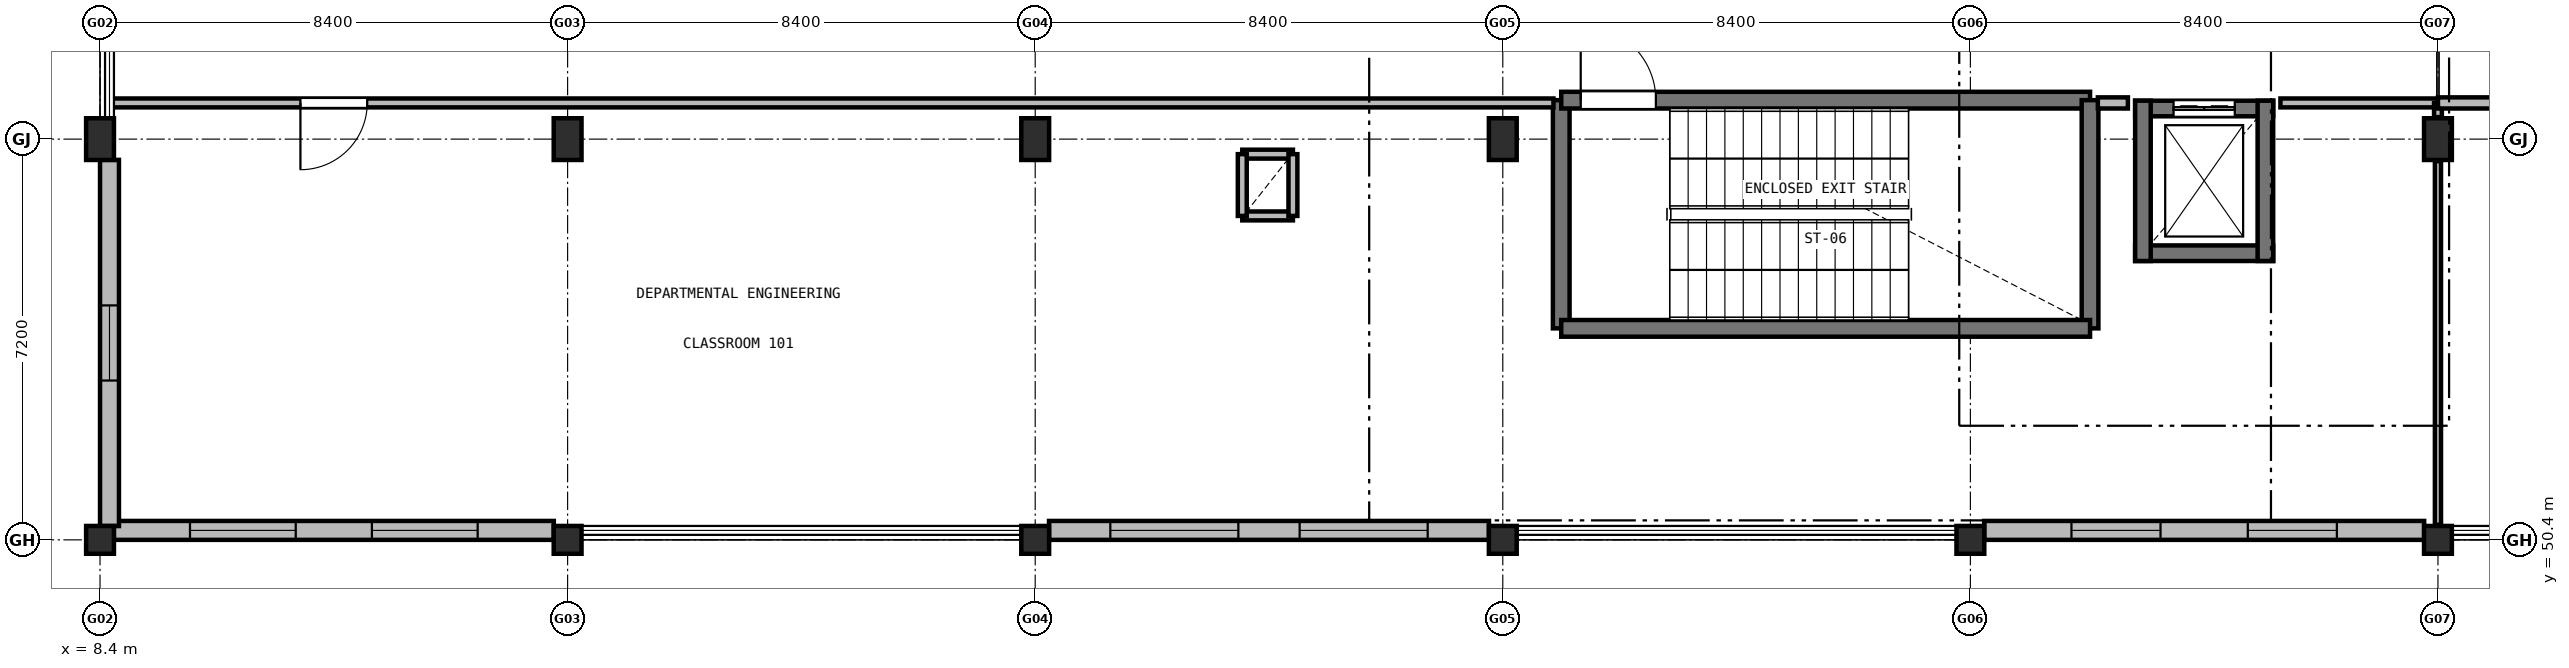
"""IFC4 building model, lengths in metres.
Left out: names, types, materials, properties, quantities, classifications, styles, units other than length and angle.
Written with IfcOpenShell. Run it as: python <this file> out.ifc"""

import sys

from ifc_helpers import new_model, si_unit, direction, frame, frame_2d, origin, origin_2d, place, context, subcontext, project, spatial, rectangle, extrude, element, fill, save


model = new_model("IFC4")
c1 = context("Model", 3, precision=1e-05, world=origin(), true_north=direction((0.0, 1.0)))
c2 = subcontext(c1, "Body", "Model", "MODEL_VIEW")
j1 = project(units=[si_unit("LENGTHUNIT", "METRE"), si_unit("PLANEANGLEUNIT", "RADIAN")], contexts=[c1])
p1 = place(None, origin())
s1 = spatial("IfcSite", under=j1, at=p1, CompositionType="ELEMENT")
p2 = place(p1, origin())
s2 = spatial("IfcBuilding", under=s1, at=p2, CompositionType="ELEMENT")
p3 = place(p2, frame((0.0, 0.0, 5.1)))
s3 = spatial("IfcBuildingStorey", under=s2, at=p3, CompositionType="ELEMENT", Elevation=5.1)
p4 = place(p3, frame((8.4, 50.4, 0.0), z_axis=(0.0, 0.0, 1.0), x_axis=(1.0, 0.0, 0.0)))
e1 = element("IfcColumn", 1, at=p4, inside=s3, PredefinedType="COLUMN", context=c2, shape_type="SweptSolid", body=[
    extrude(rectangle(XDim=0.5, YDim=0.5, at=origin_2d()), origin(), (0.0, 0.0, 1.0), 4.2),
])
p5 = place(p3, frame((8.4, 57.6, 0.0), z_axis=(0.0, 0.0, 1.0), x_axis=(1.0, 0.0, 0.0)))
e2 = element("IfcColumn", 2, at=p5, inside=s3, PredefinedType="COLUMN", context=c2, shape_type="SweptSolid", body=[
    extrude(rectangle(XDim=0.5, YDim=0.75, at=origin_2d()), origin(), (0.0, 0.0, 1.0), 4.2),
])
p6 = place(p3, frame((16.8, 50.4, 0.0), z_axis=(0.0, 0.0, 1.0), x_axis=(1.0, 0.0, 0.0)))
e3 = element("IfcColumn", 3, at=p6, inside=s3, PredefinedType="COLUMN", context=c2, shape_type="SweptSolid", body=[
    extrude(rectangle(XDim=0.5, YDim=0.5, at=origin_2d()), origin(), (0.0, 0.0, 1.0), 4.2),
])
p7 = place(p3, frame((16.8, 57.6, 0.0), z_axis=(0.0, 0.0, 1.0), x_axis=(1.0, 0.0, 0.0)))
e4 = element("IfcColumn", 4, at=p7, inside=s3, PredefinedType="COLUMN", context=c2, shape_type="SweptSolid", body=[
    extrude(rectangle(XDim=0.5, YDim=0.75, at=origin_2d()), origin(), (0.0, 0.0, 1.0), 4.2),
])
p8 = place(p3, frame((25.2, 50.4, 0.0), z_axis=(0.0, 0.0, 1.0), x_axis=(1.0, 0.0, 0.0)))
e5 = element("IfcColumn", 5, at=p8, inside=s3, PredefinedType="COLUMN", context=c2, shape_type="SweptSolid", body=[
    extrude(rectangle(XDim=0.5, YDim=0.5, at=origin_2d()), origin(), (0.0, 0.0, 1.0), 4.2),
])
p9 = place(p3, frame((25.2, 57.6, 0.0), z_axis=(0.0, 0.0, 1.0), x_axis=(1.0, 0.0, 0.0)))
e6 = element("IfcColumn", 6, at=p9, inside=s3, PredefinedType="COLUMN", context=c2, shape_type="SweptSolid", body=[
    extrude(rectangle(XDim=0.5, YDim=0.75, at=origin_2d()), origin(), (0.0, 0.0, 1.0), 4.2),
])
p10 = place(p3, frame((33.6, 50.4, 0.0), z_axis=(0.0, 0.0, 1.0), x_axis=(1.0, 0.0, 0.0)))
e7 = element("IfcColumn", 7, at=p10, inside=s3, PredefinedType="COLUMN", context=c2, shape_type="SweptSolid", body=[
    extrude(rectangle(XDim=0.5, YDim=0.5, at=origin_2d()), origin(), (0.0, 0.0, 1.0), 4.2),
])
p11 = place(p3, frame((33.6, 57.6, 0.0), z_axis=(0.0, 0.0, 1.0), x_axis=(1.0, 0.0, 0.0)))
e8 = element("IfcColumn", 8, at=p11, inside=s3, PredefinedType="COLUMN", context=c2, shape_type="SweptSolid", body=[
    extrude(rectangle(XDim=0.5, YDim=0.75, at=origin_2d()), origin(), (0.0, 0.0, 1.0), 4.2),
])
for number, where, z_axis, x_axis in (
    (9, (42.0, 50.4, 0.0), (0.0, 0.0, 1.0), (1.0, 0.0, 0.0)),
    (10, (50.4, 50.4, 0.0), (0.0, 0.0, 1.0), (1.0, 0.0, 0.0)),
):
    element("IfcColumn", number, at=place(p3, frame(where, z_axis=z_axis, x_axis=x_axis)), inside=s3, PredefinedType="COLUMN", context=c2, shape_type="SweptSolid", body=[
        extrude(rectangle(XDim=0.5, YDim=0.5, at=origin_2d()), origin(), (0.0, 0.0, 1.0), 4.2),
    ])
p12 = place(p3, frame((50.4, 57.6, 0.0), z_axis=(0.0, 0.0, 1.0), x_axis=(1.0, 0.0, 0.0)))
e11 = element("IfcColumn", 11, at=p12, inside=s3, PredefinedType="COLUMN", context=c2, shape_type="SweptSolid", body=[
    extrude(rectangle(XDim=0.5, YDim=0.75, at=origin_2d()), origin(), (0.0, 0.0, 1.0), 4.2),
])
p13 = place(p3, frame((50.152, 50.57, 0.0), z_axis=(0.0, 0.0, 1.0), x_axis=(-1.0, 0.0, 0.0)))
e12 = element("IfcWall", 12, at=p13, inside=s3, PredefinedType="SOLIDWALL", context=c2, shape_type="SweptSolid", body=[
    extrude(rectangle(XDim=7.904, YDim=0.34, at=frame_2d((3.952, 0.0))), origin(), (0.0, 0.0, 1.0), 3.11),
])
p14 = place(p13, frame((1.568, 0.0, 0.95)))
e13 = element("IfcOpeningElement", 13, at=p14, cuts=e12, PredefinedType="OPENING", context=c2, shape_type="SweptSolid", body=[
    extrude(rectangle(XDim=1.6, YDim=1.6, at=frame_2d((0.8, 0.8))), frame((0.0, 0.18, 0.0), z_axis=(0.0, -1.0, 0.0), x_axis=(1.0, 0.0, 0.0)), (0.0, 0.0, 1.0), 0.36),
])
p15 = place(p13, frame((4.736, 0.0, 0.95)))
e14 = element("IfcOpeningElement", 14, at=p15, cuts=e12, PredefinedType="OPENING", context=c2, shape_type="SweptSolid", body=[
    extrude(rectangle(XDim=1.6, YDim=1.6, at=frame_2d((0.8, 0.8))), frame((0.0, 0.18, 0.0), z_axis=(0.0, -1.0, 0.0), x_axis=(1.0, 0.0, 0.0)), (0.0, 0.0, 1.0), 0.36),
])
p16 = place(p3, frame((33.352, 50.57, 0.0), z_axis=(0.0, 0.0, 1.0), x_axis=(-1.0, 0.0, 0.0)))
e15 = element("IfcWall", 15, at=p16, inside=s3, PredefinedType="SOLIDWALL", context=c2, shape_type="SweptSolid", body=[
    extrude(rectangle(XDim=7.904, YDim=0.34, at=frame_2d((3.952, 0.0))), origin(), (0.0, 0.0, 1.0), 3.11),
])
p17 = place(p16, frame((1.101, 0.0, 0.95)))
e16 = element("IfcOpeningElement", 16, at=p17, cuts=e15, PredefinedType="OPENING", context=c2, shape_type="SweptSolid", body=[
    extrude(rectangle(XDim=2.3, YDim=1.91, at=frame_2d((1.15, 0.955))), frame((0.0, 0.18, 0.0), z_axis=(0.0, -1.0, 0.0), x_axis=(1.0, 0.0, 0.0)), (0.0, 0.0, 1.0), 0.36),
])
p18 = place(p16, frame((4.503, 0.0, 0.95)))
e17 = element("IfcOpeningElement", 17, at=p18, cuts=e15, PredefinedType="OPENING", context=c2, shape_type="SweptSolid", body=[
    extrude(rectangle(XDim=2.3, YDim=1.91, at=frame_2d((1.15, 0.955))), frame((0.0, 0.18, 0.0), z_axis=(0.0, -1.0, 0.0), x_axis=(1.0, 0.0, 0.0)), (0.0, 0.0, 1.0), 0.36),
])
p19 = place(p3, frame((16.552, 50.57, 0.0), z_axis=(0.0, 0.0, 1.0), x_axis=(-1.0, 0.0, 0.0)))
e18 = element("IfcWall", 18, at=p19, inside=s3, PredefinedType="SOLIDWALL", context=c2, shape_type="SweptSolid", body=[
    extrude(rectangle(XDim=7.904, YDim=0.34, at=frame_2d((3.952, 0.0))), origin(), (0.0, 0.0, 1.0), 3.11),
])
p20 = place(p19, frame((1.368, 0.0, 0.95)))
e19 = element("IfcOpeningElement", 19, at=p20, cuts=e18, PredefinedType="OPENING", context=c2, shape_type="SweptSolid", body=[
    extrude(rectangle(XDim=1.9, YDim=1.75, at=frame_2d((0.95, 0.875))), frame((0.0, 0.18, 0.0), z_axis=(0.0, -1.0, 0.0), x_axis=(1.0, 0.0, 0.0)), (0.0, 0.0, 1.0), 0.36),
])
p21 = place(p19, frame((4.636, 0.0, 0.95)))
e20 = element("IfcOpeningElement", 20, at=p21, cuts=e18, PredefinedType="OPENING", context=c2, shape_type="SweptSolid", body=[
    extrude(rectangle(XDim=1.9, YDim=1.75, at=frame_2d((0.95, 0.875))), frame((0.0, 0.18, 0.0), z_axis=(0.0, -1.0, 0.0), x_axis=(1.0, 0.0, 0.0)), (0.0, 0.0, 1.0), 0.36),
])
p22 = place(p3, frame((8.57, 50.648, 0.0), z_axis=(0.0, 0.0, 1.0), x_axis=(0.0, 1.0, 0.0)))
e21 = element("IfcWall", 21, at=p22, inside=s3, PredefinedType="SOLIDWALL", context=c2, shape_type="SweptSolid", body=[
    extrude(rectangle(XDim=6.579, YDim=0.34, at=frame_2d((3.29, 0.0))), origin(), (0.0, 0.0, 1.0), 3.31),
])
p23 = place(p22, frame((2.615, 0.0, 0.95)))
e22 = element("IfcOpeningElement", 22, at=p23, cuts=e21, PredefinedType="OPENING", context=c2, shape_type="SweptSolid", body=[
    extrude(rectangle(XDim=1.35, YDim=1.55, at=frame_2d((0.675, 0.775))), frame((0.0, 0.18, 0.0), z_axis=(0.0, -1.0, 0.0), x_axis=(1.0, 0.0, 0.0)), (0.0, 0.0, 1.0), 0.36),
])
p24 = place(p3, frame((34.65, 54.2, 0.0), z_axis=(0.0, 0.0, 1.0), x_axis=(0.0, 1.0, 0.0)))
e23 = element("IfcWall", 23, at=p24, inside=s3, PredefinedType="SHEAR", context=c2, shape_type="SweptSolid", body=[
    extrude(rectangle(XDim=4.1, YDim=0.3, at=frame_2d((2.05, 0.0))), origin(), (0.0, 0.0, 1.0), 3.92),
])
p25 = place(p3, frame((34.65, 58.3, 0.0), z_axis=(0.0, 0.0, 1.0), x_axis=(1.0, 0.0, 0.0)))
e24 = element("IfcWall", 24, at=p25, inside=s3, PredefinedType="SHEAR", context=c2, shape_type="SweptSolid", body=[
    extrude(rectangle(XDim=9.5, YDim=0.3, at=frame_2d((4.75, 0.0))), origin(), (0.0, 0.0, 1.0), 3.92),
])
p26 = place(p25, frame((0.35, 0.0, 0.0)))
e25 = element("IfcOpeningElement", 25, at=p26, cuts=e24, PredefinedType="OPENING", context=c2, shape_type="SweptSolid", body=[
    extrude(rectangle(XDim=1.35, YDim=2.2, at=frame_2d((0.675, 1.1))), frame((0.0, 0.16, 0.0), z_axis=(0.0, -1.0, 0.0), x_axis=(1.0, 0.0, 0.0)), (0.0, 0.0, 1.0), 0.32),
])
p27 = place(p3, frame((44.15, 58.3, 0.0), z_axis=(0.0, 0.0, 1.0), x_axis=(0.0, -1.0, 0.0)))
e26 = element("IfcWall", 26, at=p27, inside=s3, PredefinedType="SHEAR", context=c2, shape_type="SweptSolid", body=[
    extrude(rectangle(XDim=4.1, YDim=0.3, at=frame_2d((2.05, 0.0))), origin(), (0.0, 0.0, 1.0), 3.92),
])
p28 = place(p3, frame((44.15, 54.2, 0.0), z_axis=(0.0, 0.0, 1.0), x_axis=(-1.0, 0.0, 0.0)))
e27 = element("IfcWall", 27, at=p28, inside=s3, PredefinedType="SHEAR", context=c2, shape_type="SweptSolid", body=[
    extrude(rectangle(XDim=9.5, YDim=0.3, at=frame_2d((4.75, 0.0))), origin(), (0.0, 0.0, 1.0), 3.92),
])
p29 = place(p3, frame((47.44, 55.55, 0.0), z_axis=(0.0, 0.0, 1.0), x_axis=(-1.0, 0.0, 0.0)))
e28 = element("IfcWall", 28, at=p29, inside=s3, PredefinedType="SHEAR", context=c2, shape_type="SweptSolid", body=[
    extrude(rectangle(XDim=2.48, YDim=0.28, at=frame_2d((1.24, 0.0))), origin(), (0.0, 0.0, 1.0), 3.92),
])
p30 = place(p3, frame((44.96, 58.15, 0.0), z_axis=(0.0, 0.0, 1.0), x_axis=(1.0, 0.0, 0.0)))
e29 = element("IfcWall", 29, at=p30, inside=s3, PredefinedType="SHEAR", context=c2, shape_type="SweptSolid", body=[
    extrude(rectangle(XDim=2.48, YDim=0.28, at=frame_2d((1.24, 0.0))), origin(), (0.0, 0.0, 1.0), 3.92),
])
p31 = place(p30, frame((0.69, 0.0, 0.0)))
e30 = element("IfcOpeningElement", 30, at=p31, cuts=e29, PredefinedType="OPENING", context=c2, shape_type="SweptSolid", body=[
    extrude(rectangle(XDim=1.1, YDim=2.15, at=frame_2d((0.55, 1.075))), frame((0.0, 0.15, 0.0), z_axis=(0.0, -1.0, 0.0), x_axis=(1.0, 0.0, 0.0)), (0.0, 0.0, 1.0), 0.3),
])
for number, where, z_axis, x_axis in (
    (31, (45.1, 55.41, 0.0), (0.0, 0.0, 1.0), (0.0, 1.0, 0.0)),
    (32, (47.3, 58.29, 0.0), (0.0, 0.0, 1.0), (0.0, -1.0, 0.0)),
):
    element("IfcWall", number, at=place(p3, frame(where, z_axis=z_axis, x_axis=x_axis)), inside=s3, PredefinedType="SHEAR", context=c2, shape_type="SweptSolid", body=[
        extrude(rectangle(XDim=2.88, YDim=0.28, at=frame_2d((1.44, 0.0))), origin(), (0.0, 0.0, 1.0), 3.92),
    ])
p32 = place(p3, frame((28.92, 56.22, 0.0), z_axis=(0.0, 0.0, 1.0), x_axis=(1.0, 0.0, 0.0)))
e33 = element("IfcWall", 33, at=p32, inside=s3, PredefinedType="PARTITIONING", context=c2, shape_type="SweptSolid", body=[
    extrude(rectangle(XDim=0.91, YDim=0.16, at=frame_2d((0.455, 0.0))), origin(), (0.0, 0.0, 1.0), 3.65),
])
p33 = place(p3, frame((29.83, 57.33, 0.0), z_axis=(0.0, 0.0, 1.0), x_axis=(-1.0, 0.0, 0.0)))
e34 = element("IfcWall", 34, at=p33, inside=s3, PredefinedType="PARTITIONING", context=c2, shape_type="SweptSolid", body=[
    extrude(rectangle(XDim=0.91, YDim=0.16, at=frame_2d((0.455, 0.0))), origin(), (0.0, 0.0, 1.0), 3.155),
])
for number, where, z_axis, x_axis in (
    (35, (28.92, 57.33, 0.0), (0.0, 0.0, 1.0), (0.0, -1.0, 0.0)),
    (36, (29.83, 56.22, 0.0), (0.0, 0.0, 1.0), (0.0, 1.0, 0.0)),
):
    element("IfcWall", number, at=place(p3, frame(where, z_axis=z_axis, x_axis=x_axis)), inside=s3, PredefinedType="PARTITIONING", context=c2, shape_type="SweptSolid", body=[
        extrude(rectangle(XDim=1.11, YDim=0.16, at=frame_2d((0.555, 0.0))), origin(), (0.0, 0.0, 1.0), 3.155),
    ])
p34 = place(p3, frame((50.4, 58.25, 0.0), z_axis=(0.0, 0.0, 1.0), x_axis=(-1.0, 0.0, 0.0)))
e37 = element("IfcWall", 37, at=p34, inside=s3, PredefinedType="PARTITIONING", context=c2, shape_type="SweptSolid", body=[
    extrude(rectangle(XDim=2.83, YDim=0.16, at=frame_2d((1.415, 0.0))), origin(), (0.0, 0.0, 1.0), 3.305),
])
p35 = place(p3, frame((44.83, 58.25, 0.0), z_axis=(0.0, 0.0, 1.0), x_axis=(-1.0, 0.0, 0.0)))
e38 = element("IfcWall", 38, at=p35, inside=s3, PredefinedType="SOLIDWALL", context=c2, shape_type="SweptSolid", body=[
    extrude(rectangle(XDim=0.54, YDim=0.2, at=frame_2d((0.27, 0.0))), origin(), (0.0, 0.0, 1.0), 3.85),
])
p36 = place(p3, frame((34.51, 58.25, 0.0), z_axis=(0.0, 0.0, 1.0), x_axis=(-1.0, 0.0, 0.0)))
e39 = element("IfcWall", 39, at=p36, inside=s3, PredefinedType="PARTITIONING", context=c2, shape_type="SweptSolid", body=[
    extrude(rectangle(XDim=25.89, YDim=0.16, at=frame_2d((12.945, 0.0))), origin(), (0.0, 0.0, 1.0), 3.305),
])
p37 = place(p36, frame((21.31, 0.0, 0.0)))
e40 = element("IfcOpeningElement", 40, at=p37, cuts=e39, PredefinedType="OPENING", context=c2, shape_type="SweptSolid", body=[
    extrude(rectangle(XDim=1.2, YDim=2.15, at=frame_2d((0.6, 1.075))), frame((0.0, 0.09, 0.0), z_axis=(0.0, -1.0, 0.0), x_axis=(1.0, 0.0, 0.0)), (0.0, 0.0, 1.0), 0.18),
])
p38 = place(p3, frame((50.4, 50.67, 0.0), z_axis=(0.0, 0.0, 1.0), x_axis=(0.0, 1.0, 0.0)))
e41 = element("IfcWall", 41, at=p38, inside=s3, PredefinedType="PARTITIONING", context=c2, shape_type="SweptSolid", body=[
    extrude(rectangle(XDim=6.535, YDim=0.11, at=frame_2d((3.268, 0.0))), origin(), (0.0, 0.0, 1.0), 3.105),
])
p39 = place(p3, frame((50.4, 57.995, 0.0), z_axis=(0.0, 0.0, 1.0), x_axis=(0.0, 1.0, 0.0)))
e42 = element("IfcWall", 42, at=p39, inside=s3, PredefinedType="PARTITIONING", context=c2, shape_type="SweptSolid", body=[
    extrude(rectangle(XDim=0.255, YDim=0.14, at=frame_2d((0.127, 0.0))), origin(), (0.0, 0.0, 1.0), 3.155),
])
p40 = place(p3, frame((92.4, 58.25, 0.0), z_axis=(0.0, 0.0, 1.0), x_axis=(-1.0, 0.0, 0.0)))
e43 = element("IfcWall", 43, at=p40, inside=s3, PredefinedType="SOLIDWALL", context=c2, shape_type="SweptSolid", body=[
    extrude(rectangle(XDim=42.0, YDim=0.2, at=frame_2d((21.0, 0.0))), origin(), (0.0, 0.0, 1.0), 3.305),
])
p41 = place(p40, frame((26.725, 0.0, 0.0)))
e44 = element("IfcOpeningElement", 44, at=p41, cuts=e43, PredefinedType="OPENING", context=c2, shape_type="SweptSolid", body=[
    extrude(rectangle(XDim=1.15, YDim=2.15, at=frame_2d((0.575, 1.075))), frame((0.0, 0.11, 0.0), z_axis=(0.0, -1.0, 0.0), x_axis=(1.0, 0.0, 0.0)), (0.0, 0.0, 1.0), 0.22),
])
p42 = place(p14, origin())
e45 = element("IfcWindow", 45, at=p42, inside=s3, PartitioningType="SINGLE_PANEL", PredefinedType="WINDOW", context=c2, shape_type="SweptSolid", body=[
    extrude(rectangle(XDim=1.6, YDim=1.6, at=frame_2d((0.8, 0.8))), frame((0.0, 0.03, 0.0), z_axis=(0.0, -1.0, 0.0), x_axis=(1.0, 0.0, 0.0)), (0.0, 0.0, 1.0), 0.06),
])
fill(e13, e45)
p43 = place(p15, origin())
e46 = element("IfcWindow", 46, at=p43, inside=s3, PartitioningType="SINGLE_PANEL", PredefinedType="WINDOW", context=c2, shape_type="SweptSolid", body=[
    extrude(rectangle(XDim=1.6, YDim=1.6, at=frame_2d((0.8, 0.8))), frame((0.0, 0.03, 0.0), z_axis=(0.0, -1.0, 0.0), x_axis=(1.0, 0.0, 0.0)), (0.0, 0.0, 1.0), 0.06),
])
fill(e14, e46)
p44 = place(p17, origin())
e47 = element("IfcWindow", 47, at=p44, inside=s3, PartitioningType="SINGLE_PANEL", PredefinedType="WINDOW", context=c2, shape_type="SweptSolid", body=[
    extrude(rectangle(XDim=2.3, YDim=1.91, at=frame_2d((1.15, 0.955))), frame((0.0, 0.03, 0.0), z_axis=(0.0, -1.0, 0.0), x_axis=(1.0, 0.0, 0.0)), (0.0, 0.0, 1.0), 0.06),
])
fill(e16, e47)
p45 = place(p18, origin())
e48 = element("IfcWindow", 48, at=p45, inside=s3, PartitioningType="SINGLE_PANEL", PredefinedType="WINDOW", context=c2, shape_type="SweptSolid", body=[
    extrude(rectangle(XDim=2.3, YDim=1.91, at=frame_2d((1.15, 0.955))), frame((0.0, 0.03, 0.0), z_axis=(0.0, -1.0, 0.0), x_axis=(1.0, 0.0, 0.0)), (0.0, 0.0, 1.0), 0.06),
])
fill(e17, e48)
p46 = place(p20, origin())
e49 = element("IfcWindow", 49, at=p46, inside=s3, PartitioningType="SINGLE_PANEL", PredefinedType="WINDOW", context=c2, shape_type="SweptSolid", body=[
    extrude(rectangle(XDim=1.9, YDim=1.75, at=frame_2d((0.95, 0.875))), frame((0.0, 0.03, 0.0), z_axis=(0.0, -1.0, 0.0), x_axis=(1.0, 0.0, 0.0)), (0.0, 0.0, 1.0), 0.06),
])
fill(e19, e49)
p47 = place(p21, origin())
e50 = element("IfcWindow", 50, at=p47, inside=s3, PartitioningType="SINGLE_PANEL", PredefinedType="WINDOW", context=c2, shape_type="SweptSolid", body=[
    extrude(rectangle(XDim=1.9, YDim=1.75, at=frame_2d((0.95, 0.875))), frame((0.0, 0.03, 0.0), z_axis=(0.0, -1.0, 0.0), x_axis=(1.0, 0.0, 0.0)), (0.0, 0.0, 1.0), 0.06),
])
fill(e20, e50)
p48 = place(p23, origin())
e51 = element("IfcWindow", 51, at=p48, inside=s3, PartitioningType="SINGLE_PANEL", PredefinedType="WINDOW", context=c2, shape_type="SweptSolid", body=[
    extrude(rectangle(XDim=1.35, YDim=1.55, at=frame_2d((0.675, 0.775))), frame((0.0, 0.03, 0.0), z_axis=(0.0, -1.0, 0.0), x_axis=(1.0, 0.0, 0.0)), (0.0, 0.0, 1.0), 0.06),
])
fill(e22, e51)
p49 = place(p26, origin())
e52 = element("IfcDoor", 52, at=p49, inside=s3, OperationType="SINGLE_SWING_LEFT", PredefinedType="DOOR", context=c2, shape_type="SweptSolid", body=[
    extrude(rectangle(XDim=1.35, YDim=2.2, at=frame_2d((0.675, 1.1))), frame((0.0, 0.025, 0.0), z_axis=(0.0, -1.0, 0.0), x_axis=(1.0, 0.0, 0.0)), (0.0, 0.0, 1.0), 0.05),
])
fill(e25, e52)
p50 = place(p31, origin())
e53 = element("IfcDoor", 53, at=p50, inside=s3, OperationType="DOUBLE_DOOR_SLIDING", PredefinedType="DOOR", context=c2, shape_type="SweptSolid", body=[
    extrude(rectangle(XDim=1.1, YDim=2.15, at=frame_2d((0.55, 1.075))), frame((0.0, 0.025, 0.0), z_axis=(0.0, -1.0, 0.0), x_axis=(1.0, 0.0, 0.0)), (0.0, 0.0, 1.0), 0.05),
])
fill(e30, e53)
p51 = place(p37, origin())
e54 = element("IfcDoor", 54, at=p51, inside=s3, OperationType="SINGLE_SWING_RIGHT", PredefinedType="DOOR", context=c2, shape_type="SweptSolid", body=[
    extrude(rectangle(XDim=1.2, YDim=2.15, at=frame_2d((0.6, 1.075))), frame((0.0, 0.025, 0.0), z_axis=(0.0, -1.0, 0.0), x_axis=(1.0, 0.0, 0.0)), (0.0, 0.0, 1.0), 0.05),
])
fill(e40, e54)
save(model, sys.argv[1])
